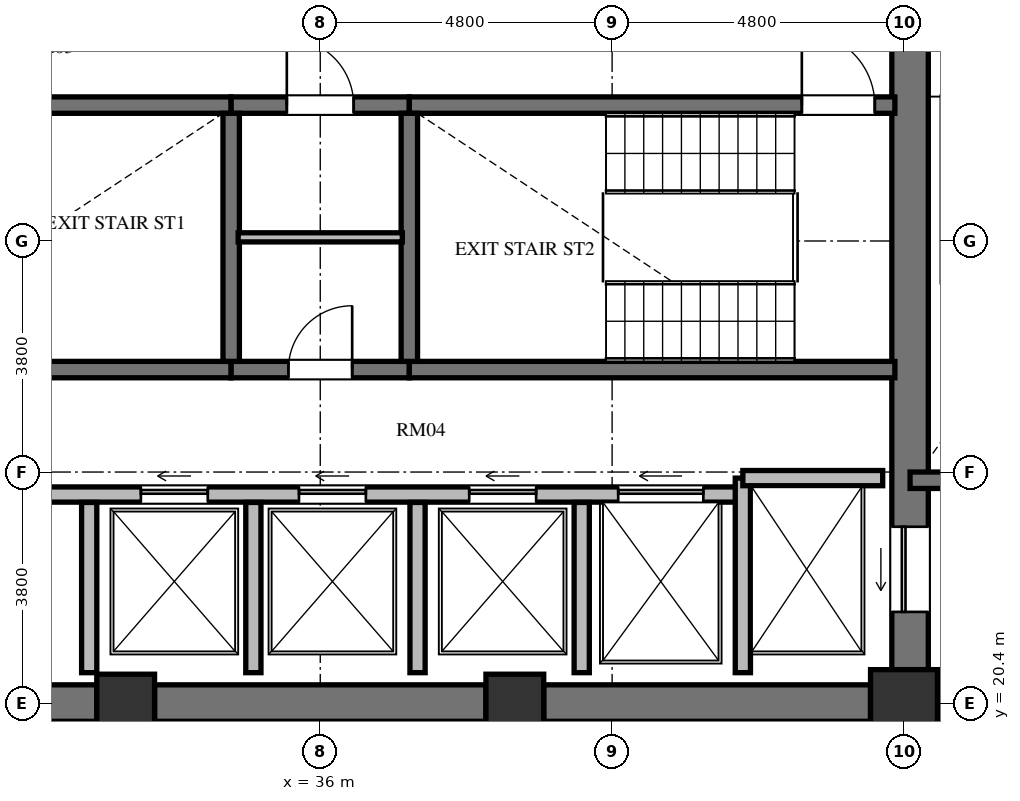
"""IFC4 building model, lengths in metres.
Left out: names, types, materials, properties, quantities, classifications, styles, units other than length and angle.
Written with IfcOpenShell. Run it as: python <this file> out.ifc"""

import sys

from ifc_helpers import new_model, si_unit, direction, frame, frame_2d, origin, origin_2d, place, context, subcontext, project, spatial, rectangle, extrude, element, fill, save


model = new_model("IFC4")
c1 = context("Model", 3, precision=1e-05, world=origin(), true_north=direction((0.0, 1.0)))
c2 = subcontext(c1, "Body", "Model", "MODEL_VIEW")
j1 = project(units=[si_unit("LENGTHUNIT", "METRE"), si_unit("PLANEANGLEUNIT", "RADIAN")], contexts=[c1])
p1 = place(None, origin())
s1 = spatial("IfcSite", under=j1, at=p1, CompositionType="ELEMENT")
p2 = place(p1, origin())
s2 = spatial("IfcBuilding", under=s1, at=p2, CompositionType="ELEMENT")
p3 = place(p2, frame((0.0, 0.0, 178.416)))
s3 = spatial("IfcBuildingStorey", under=s2, at=p3, CompositionType="ELEMENT", Elevation=178.416)
for number, where, z_axis, x_axis in (
    (1, (32.8, 20.4, 0.0), (0.0, 0.0, 1.0), (1.0, 0.0, 0.0)),
    (2, (39.2, 20.4, 0.0), (0.0, 0.0, 1.0), (1.0, 0.0, 0.0)),
):
    element("IfcColumn", number, at=place(p3, frame(where, z_axis=z_axis, x_axis=x_axis)), inside=s3, PredefinedType="COLUMN", context=c2, shape_type="SweptSolid", body=[
        extrude(rectangle(XDim=0.95, YDim=0.95, at=origin_2d()), origin(), (0.0, 0.0, 1.0), 3.648),
    ])
p4 = place(p3, frame((45.6, 20.4, 0.0), z_axis=(0.0, 0.0, 1.0), x_axis=(1.0, 0.0, 0.0)))
e3 = element("IfcColumn", 3, at=p4, inside=s3, PredefinedType="COLUMN", context=c2, shape_type="SweptSolid", body=[
    extrude(rectangle(XDim=1.1, YDim=1.1, at=origin_2d()), origin(), (0.0, 0.0, 1.0), 3.648),
])
p5 = place(p3, frame((45.7, 20.95, 0.0), z_axis=(0.0, 0.0, 1.0), x_axis=(0.0, 1.0, 0.0)))
e4 = element("IfcWall", 4, at=p5, inside=s3, PredefinedType="SHEAR", context=c2, shape_type="SweptSolid", body=[
    extrude(rectangle(XDim=14.1, YDim=0.6, at=frame_2d((7.05, 0.0))), origin(), (0.0, 0.0, 1.0), 3.648),
])
p6 = place(p5, frame((11.75, 0.0, 0.0)))
e5 = element("IfcOpeningElement", 5, at=p6, cuts=e4, PredefinedType="OPENING", context=c2, shape_type="SweptSolid", body=[
    extrude(rectangle(XDim=1.4, YDim=2.3, at=frame_2d((0.7, 1.15))), frame((0.0, 0.31, 0.0), z_axis=(0.0, -1.0, 0.0), x_axis=(1.0, 0.0, 0.0)), (0.0, 0.0, 1.0), 0.62),
])
p7 = place(p5, frame((0.95, 0.0, 0.0)))
e6 = element("IfcOpeningElement", 6, at=p7, cuts=e4, PredefinedType="OPENING", context=c2, shape_type="SweptSolid", body=[
    extrude(rectangle(XDim=1.4, YDim=2.3, at=frame_2d((0.7, 1.15))), frame((0.0, 0.31, 0.0), z_axis=(0.0, -1.0, 0.0), x_axis=(1.0, 0.0, 0.0)), (0.0, 0.0, 1.0), 0.62),
])
p8 = place(p3, frame((26.95, 20.4, 0.0), z_axis=(0.0, 0.0, 1.0), x_axis=(1.0, 0.0, 0.0)))
e7 = element("IfcWall", 7, at=p8, inside=s3, PredefinedType="SHEAR", context=c2, shape_type="SweptSolid", body=[
    extrude(rectangle(XDim=5.375, YDim=0.6, at=frame_2d((2.688, 0.0))), origin(), (0.0, 0.0, 1.0), 3.648),
])
p9 = place(p3, frame((33.275, 20.4, 0.0), z_axis=(0.0, 0.0, 1.0), x_axis=(1.0, 0.0, 0.0)))
e8 = element("IfcWall", 8, at=p9, inside=s3, PredefinedType="SHEAR", context=c2, shape_type="SweptSolid", body=[
    extrude(rectangle(XDim=5.45, YDim=0.6, at=frame_2d((2.725, 0.0))), origin(), (0.0, 0.0, 1.0), 3.648),
])
p10 = place(p3, frame((39.675, 20.4, 0.0), z_axis=(0.0, 0.0, 1.0), x_axis=(1.0, 0.0, 0.0)))
e9 = element("IfcWall", 9, at=p10, inside=s3, PredefinedType="SHEAR", context=c2, shape_type="SweptSolid", body=[
    extrude(rectangle(XDim=5.375, YDim=0.6, at=frame_2d((2.688, 0.0))), origin(), (0.0, 0.0, 1.0), 3.648),
])
p11 = place(p3, frame((26.55, 30.235, 0.0), z_axis=(0.0, 0.0, 1.0), x_axis=(1.0, 0.0, 0.0)))
e10 = element("IfcWall", 10, at=p11, inside=s3, PredefinedType="SHEAR", context=c2, shape_type="SweptSolid", body=[
    extrude(rectangle(XDim=7.985, YDim=0.27, at=frame_2d((3.992, 0.0))), origin(), (0.0, 0.0, 1.0), 3.648),
])
p12 = place(p3, frame((34.535, 30.235, 0.0), z_axis=(0.0, 0.0, 1.0), x_axis=(1.0, 0.0, 0.0)))
e11 = element("IfcWall", 11, at=p12, inside=s3, PredefinedType="SHEAR", context=c2, shape_type="SweptSolid", body=[
    extrude(rectangle(XDim=2.93, YDim=0.27, at=frame_2d((1.465, 0.0))), origin(), (0.0, 0.0, 1.0), 3.648),
])
p13 = place(p12, frame((0.915, 0.0, 0.0)))
e12 = element("IfcOpeningElement", 12, at=p13, cuts=e11, PredefinedType="OPENING", context=c2, shape_type="SweptSolid", body=[
    extrude(rectangle(XDim=1.1, YDim=2.15, at=frame_2d((0.55, 1.075))), frame((0.0, 0.145, 0.0), z_axis=(0.0, -1.0, 0.0), x_axis=(1.0, 0.0, 0.0)), (0.0, 0.0, 1.0), 0.29),
])
p14 = place(p3, frame((37.465, 30.235, 0.0), z_axis=(0.0, 0.0, 1.0), x_axis=(1.0, 0.0, 0.0)))
e13 = element("IfcWall", 13, at=p14, inside=s3, PredefinedType="SHEAR", context=c2, shape_type="SweptSolid", body=[
    extrude(rectangle(XDim=7.985, YDim=0.27, at=frame_2d((3.992, 0.0))), origin(), (0.0, 0.0, 1.0), 3.648),
])
p15 = place(p14, frame((6.455, 0.0, 0.0)))
e14 = element("IfcOpeningElement", 14, at=p15, cuts=e13, PredefinedType="OPENING", context=c2, shape_type="SweptSolid", body=[
    extrude(rectangle(XDim=1.2, YDim=2.15, at=frame_2d((0.6, 1.075))), frame((0.0, 0.145, 0.0), z_axis=(0.0, -1.0, 0.0), x_axis=(1.0, 0.0, 0.0)), (0.0, 0.0, 1.0), 0.29),
])
p16 = place(p3, frame((26.55, 25.885, 0.0), z_axis=(0.0, 0.0, 1.0), x_axis=(1.0, 0.0, 0.0)))
e15 = element("IfcWall", 15, at=p16, inside=s3, PredefinedType="SHEAR", context=c2, shape_type="SweptSolid", body=[
    extrude(rectangle(XDim=7.985, YDim=0.27, at=frame_2d((3.992, 0.0))), origin(), (0.0, 0.0, 1.0), 3.648),
])
p17 = place(p3, frame((34.535, 25.885, 0.0), z_axis=(0.0, 0.0, 1.0), x_axis=(1.0, 0.0, 0.0)))
e16 = element("IfcWall", 16, at=p17, inside=s3, PredefinedType="SHEAR", context=c2, shape_type="SweptSolid", body=[
    extrude(rectangle(XDim=2.93, YDim=0.27, at=frame_2d((1.465, 0.0))), origin(), (0.0, 0.0, 1.0), 3.648),
])
p18 = place(p17, frame((0.94, 0.0, 0.0)))
e17 = element("IfcOpeningElement", 17, at=p18, cuts=e16, PredefinedType="OPENING", context=c2, shape_type="SweptSolid", body=[
    extrude(rectangle(XDim=1.05, YDim=2.15, at=frame_2d((0.525, 1.075))), frame((0.0, 0.145, 0.0), z_axis=(0.0, -1.0, 0.0), x_axis=(1.0, 0.0, 0.0)), (0.0, 0.0, 1.0), 0.29),
])
p19 = place(p3, frame((37.465, 25.885, 0.0), z_axis=(0.0, 0.0, 1.0), x_axis=(1.0, 0.0, 0.0)))
e18 = element("IfcWall", 18, at=p19, inside=s3, PredefinedType="SHEAR", context=c2, shape_type="SweptSolid", body=[
    extrude(rectangle(XDim=7.985, YDim=0.27, at=frame_2d((3.992, 0.0))), origin(), (0.0, 0.0, 1.0), 3.648),
])
for number, where, z_axis, x_axis in (
    (19, (34.535, 26.02, 0.0), (0.0, 0.0, 1.0), (0.0, 1.0, 0.0)),
    (20, (37.465, 26.02, 0.0), (0.0, 0.0, 1.0), (0.0, 1.0, 0.0)),
):
    element("IfcWall", number, at=place(p3, frame(where, z_axis=z_axis, x_axis=x_axis)), inside=s3, PredefinedType="SHEAR", context=c2, shape_type="SweptSolid", body=[
        extrude(rectangle(XDim=4.08, YDim=0.27, at=frame_2d((2.04, 0.0))), origin(), (0.0, 0.0, 1.0), 3.648),
    ])
p20 = place(p3, frame((34.65, 28.06, 0.0), z_axis=(0.0, 0.0, 1.0), x_axis=(1.0, 0.0, 0.0)))
e21 = element("IfcWall", 21, at=p20, inside=s3, PredefinedType="PARTITIONING", context=c2, shape_type="SweptSolid", body=[
    extrude(rectangle(XDim=2.7, YDim=0.15, at=frame_2d((1.35, 0.0))), origin(), (0.0, 0.0, 1.0), 3.428),
])
p21 = place(p3, frame((26.75, 23.83, 0.0), z_axis=(0.0, 0.0, 1.0), x_axis=(1.0, 0.0, 0.0)))
e22 = element("IfcWall", 22, at=p21, inside=s3, PredefinedType="SOLIDWALL", context=c2, shape_type="SweptSolid", body=[
    extrude(rectangle(XDim=16.2, YDim=0.25, at=frame_2d((8.1, 0.0))), origin(), (0.0, 0.0, 1.0), 3.428),
])
p22 = place(p21, frame((2.225, 0.0, 0.0)))
e23 = element("IfcOpeningElement", 23, at=p22, cuts=e22, PredefinedType="OPENING", context=c2, shape_type="SweptSolid", body=[
    extrude(rectangle(XDim=1.05, YDim=2.15, at=frame_2d((0.525, 1.075))), frame((0.0, 0.135, 0.0), z_axis=(0.0, -1.0, 0.0), x_axis=(1.0, 0.0, 0.0)), (0.0, 0.0, 1.0), 0.27),
])
p23 = place(p21, frame((6.3, 0.0, 0.0)))
e24 = element("IfcOpeningElement", 24, at=p23, cuts=e22, PredefinedType="OPENING", context=c2, shape_type="SweptSolid", body=[
    extrude(rectangle(XDim=1.1, YDim=2.2, at=frame_2d((0.55, 1.1))), frame((0.0, 0.135, 0.0), z_axis=(0.0, -1.0, 0.0), x_axis=(1.0, 0.0, 0.0)), (0.0, 0.0, 1.0), 0.27),
])
p24 = place(p21, frame((8.9, 0.0, 0.0)))
e25 = element("IfcOpeningElement", 25, at=p24, cuts=e22, PredefinedType="OPENING", context=c2, shape_type="SweptSolid", body=[
    extrude(rectangle(XDim=1.1, YDim=2.2, at=frame_2d((0.55, 1.1))), frame((0.0, 0.135, 0.0), z_axis=(0.0, -1.0, 0.0), x_axis=(1.0, 0.0, 0.0)), (0.0, 0.0, 1.0), 0.27),
])
p25 = place(p21, frame((11.7, 0.0, 0.0)))
e26 = element("IfcOpeningElement", 26, at=p25, cuts=e22, PredefinedType="OPENING", context=c2, shape_type="SweptSolid", body=[
    extrude(rectangle(XDim=1.1, YDim=2.2, at=frame_2d((0.55, 1.1))), frame((0.0, 0.135, 0.0), z_axis=(0.0, -1.0, 0.0), x_axis=(1.0, 0.0, 0.0)), (0.0, 0.0, 1.0), 0.27),
])
p26 = place(p21, frame((14.15, 0.0, 0.0)))
e27 = element("IfcOpeningElement", 27, at=p26, cuts=e22, PredefinedType="OPENING", context=c2, shape_type="SweptSolid", body=[
    extrude(rectangle(XDim=1.4, YDim=2.3, at=frame_2d((0.7, 1.15))), frame((0.0, 0.135, 0.0), z_axis=(0.0, -1.0, 0.0), x_axis=(1.0, 0.0, 0.0)), (0.0, 0.0, 1.0), 0.27),
])
p27 = place(p3, frame((42.95, 20.9, 0.0), z_axis=(0.0, 0.0, 1.0), x_axis=(0.0, 1.0, 0.0)))
e28 = element("IfcWall", 28, at=p27, inside=s3, PredefinedType="SOLIDWALL", context=c2, shape_type="SweptSolid", body=[
    extrude(rectangle(XDim=3.2, YDim=0.25, at=frame_2d((1.6, 0.0))), origin(), (0.0, 0.0, 1.0), 3.428),
])
p28 = place(p3, frame((42.95, 24.1, 0.0), z_axis=(0.0, 0.0, 1.0), x_axis=(1.0, 0.0, 0.0)))
e29 = element("IfcWall", 29, at=p28, inside=s3, PredefinedType="SOLIDWALL", context=c2, shape_type="SweptSolid", body=[
    extrude(rectangle(XDim=2.3, YDim=0.25, at=frame_2d((1.15, 0.0))), origin(), (0.0, 0.0, 1.0), 3.428),
])
for number, where, z_axis, x_axis in (
    (30, (32.2, 20.9, 0.0), (0.0, 0.0, 1.0), (0.0, 1.0, 0.0)),
    (31, (34.9, 20.9, 0.0), (0.0, 0.0, 1.0), (0.0, 1.0, 0.0)),
    (32, (37.6, 20.9, 0.0), (0.0, 0.0, 1.0), (0.0, 1.0, 0.0)),
    (33, (40.3, 20.9, 0.0), (0.0, 0.0, 1.0), (0.0, 1.0, 0.0)),
):
    element("IfcWall", number, at=place(p3, frame(where, z_axis=z_axis, x_axis=x_axis)), inside=s3, PredefinedType="SOLIDWALL", context=c2, shape_type="SweptSolid", body=[
        extrude(rectangle(XDim=2.8, YDim=0.25, at=frame_2d((1.4, 0.0))), origin(), (0.0, 0.0, 1.0), 3.428),
    ])
p29 = place(p3, frame((45.7, 24.065, 0.0), z_axis=(0.0, 0.0, 1.0), x_axis=(1.0, 0.0, 0.0)))
e34 = element("IfcWall", 34, at=p29, inside=s3, PredefinedType="SHEAR", context=c2, shape_type="SweptSolid", body=[
    extrude(rectangle(XDim=4.715, YDim=0.27, at=frame_2d((2.357, 0.0))), origin(), (0.0, 0.0, 1.0), 3.648),
])
p30 = place(p3, frame((45.7, 20.02, 0.0), z_axis=(0.0, 0.0, 1.0), x_axis=(1.0, 0.0, 0.0)))
e35 = element("IfcWall", 35, at=p30, inside=s3, PredefinedType="SOLIDWALL", context=c2, shape_type="SweptSolid", body=[
    extrude(rectangle(XDim=4.715, YDim=0.25, at=frame_2d((2.357, 0.0))), origin(), (0.0, 0.0, 1.0), 3.428),
])
p31 = place(p15, origin())
e36 = element("IfcDoor", 36, at=p31, inside=s3, OperationType="SINGLE_SWING_LEFT", PredefinedType="DOOR", context=c2, shape_type="SweptSolid", body=[
    extrude(rectangle(XDim=1.2, YDim=2.15, at=frame_2d((0.6, 1.075))), frame((0.0, 0.025, 0.0), z_axis=(0.0, -1.0, 0.0), x_axis=(1.0, 0.0, 0.0)), (0.0, 0.0, 1.0), 0.05),
])
fill(e14, e36)
p32 = place(p18, origin())
e37 = element("IfcDoor", 37, at=p32, inside=s3, OperationType="SINGLE_SWING_RIGHT", PredefinedType="DOOR", context=c2, shape_type="SweptSolid", body=[
    extrude(rectangle(XDim=1.05, YDim=2.15, at=frame_2d((0.525, 1.075))), frame((0.0, 0.025, 0.0), z_axis=(0.0, -1.0, 0.0), x_axis=(1.0, 0.0, 0.0)), (0.0, 0.0, 1.0), 0.05),
])
fill(e17, e37)
p33 = place(p13, origin())
e38 = element("IfcDoor", 38, at=p33, inside=s3, OperationType="SINGLE_SWING_LEFT", PredefinedType="DOOR", context=c2, shape_type="SweptSolid", body=[
    extrude(rectangle(XDim=1.1, YDim=2.15, at=frame_2d((0.55, 1.075))), frame((0.0, 0.025, 0.0), z_axis=(0.0, -1.0, 0.0), x_axis=(1.0, 0.0, 0.0)), (0.0, 0.0, 1.0), 0.05),
])
fill(e12, e38)
p34 = place(p23, origin())
e39 = element("IfcDoor", 39, at=p34, inside=s3, OperationType="SLIDING_TO_LEFT", PredefinedType="DOOR", context=c2, shape_type="SweptSolid", body=[
    extrude(rectangle(XDim=1.1, YDim=2.2, at=frame_2d((0.55, 1.1))), frame((0.0, 0.025, 0.0), z_axis=(0.0, -1.0, 0.0), x_axis=(1.0, 0.0, 0.0)), (0.0, 0.0, 1.0), 0.05),
])
fill(e24, e39)
p35 = place(p24, origin())
e40 = element("IfcDoor", 40, at=p35, inside=s3, OperationType="SLIDING_TO_LEFT", PredefinedType="DOOR", context=c2, shape_type="SweptSolid", body=[
    extrude(rectangle(XDim=1.1, YDim=2.2, at=frame_2d((0.55, 1.1))), frame((0.0, 0.025, 0.0), z_axis=(0.0, -1.0, 0.0), x_axis=(1.0, 0.0, 0.0)), (0.0, 0.0, 1.0), 0.05),
])
fill(e25, e40)
p36 = place(p25, origin())
e41 = element("IfcDoor", 41, at=p36, inside=s3, OperationType="SLIDING_TO_LEFT", PredefinedType="DOOR", context=c2, shape_type="SweptSolid", body=[
    extrude(rectangle(XDim=1.1, YDim=2.2, at=frame_2d((0.55, 1.1))), frame((0.0, 0.025, 0.0), z_axis=(0.0, -1.0, 0.0), x_axis=(1.0, 0.0, 0.0)), (0.0, 0.0, 1.0), 0.05),
])
fill(e26, e41)
p37 = place(p7, origin())
e42 = element("IfcDoor", 42, at=p37, inside=s3, OperationType="SLIDING_TO_LEFT", PredefinedType="DOOR", context=c2, shape_type="SweptSolid", body=[
    extrude(rectangle(XDim=1.4, YDim=2.3, at=frame_2d((0.7, 1.15))), frame((0.0, 0.025, 0.0), z_axis=(0.0, -1.0, 0.0), x_axis=(1.0, 0.0, 0.0)), (0.0, 0.0, 1.0), 0.05),
])
fill(e6, e42)
p38 = place(p26, origin())
e43 = element("IfcDoor", 43, at=p38, inside=s3, OperationType="SLIDING_TO_LEFT", PredefinedType="DOOR", context=c2, shape_type="SweptSolid", body=[
    extrude(rectangle(XDim=1.4, YDim=2.3, at=frame_2d((0.7, 1.15))), frame((0.0, 0.025, 0.0), z_axis=(0.0, -1.0, 0.0), x_axis=(1.0, 0.0, 0.0)), (0.0, 0.0, 1.0), 0.05),
])
fill(e27, e43)
save(model, sys.argv[1])
